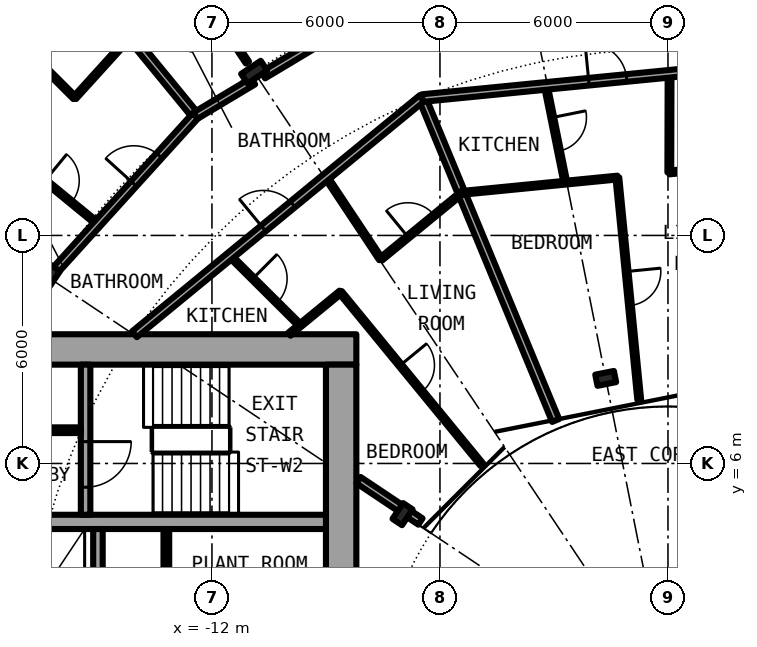
"""IFC4 building model, lengths in metres.
Left out: names, types, materials, properties, quantities, classifications, styles, units other than length and angle.
Written with IfcOpenShell. Run it as: python <this file> out.ifc"""

import sys

from ifc_helpers import new_model, si_unit, direction, frame, frame_2d, origin, origin_2d, place, context, subcontext, project, spatial, rectangle, i_section, extrude, element, fill, save


model = new_model("IFC4")
c1 = context("Model", 3, precision=1e-05, world=origin(), true_north=direction((0.0, 1.0)))
c2 = subcontext(c1, "Body", "Model", "MODEL_VIEW")
j1 = project(units=[si_unit("LENGTHUNIT", "METRE"), si_unit("PLANEANGLEUNIT", "RADIAN")], contexts=[c1])
p1 = place(None, origin())
s1 = spatial("IfcSite", under=j1, at=p1, CompositionType="ELEMENT")
p2 = place(p1, origin())
s2 = spatial("IfcBuilding", under=s1, at=p2, CompositionType="ELEMENT")
p3 = place(p2, frame((0.0, 0.0, 22.8)))
s3 = spatial("IfcBuildingStorey", under=s2, at=p3, CompositionType="ELEMENT", Elevation=22.8)
for number, where, z_axis, x_axis in (
    (1, (-10.889, 16.297, 0.0), (0.0, 0.0, 1.0), (-0.556, 0.831, 0.0)),
    (2, (-16.297, 10.889, 0.0), (0.0, 0.0, 1.0), (-0.831, 0.556, 0.0)),
):
    element("IfcColumn", number, at=place(p3, frame(where, z_axis=z_axis, x_axis=x_axis)), inside=s3, PredefinedType="COLUMN", context=c2, shape_type="SweptSolid", body=[
        extrude(i_section(OverallWidth=0.305, OverallDepth=0.62, WebThickness=0.021, FlangeThickness=0.04, FilletRadius=0.027, at=origin_2d()), origin(), (0.0, 0.0, 1.0), 3.05),
    ])
for number, where, z_axis, x_axis in (
    (3, (-1.639, 8.239, 0.0), (0.0, 0.0, 1.0), (-0.195, 0.981, 0.0)),
    (4, (-6.984, 4.667, 0.0), (0.0, 0.0, 1.0), (-0.831, 0.556, 0.0)),
):
    element("IfcColumn", number, at=place(p3, frame(where, z_axis=z_axis, x_axis=x_axis)), inside=s3, PredefinedType="COLUMN", context=c2, shape_type="SweptSolid", body=[
        extrude(i_section(OverallWidth=0.3, OverallDepth=0.5, WebThickness=0.014, FlangeThickness=0.028, FilletRadius=0.027, at=origin_2d()), origin(), (0.0, 0.0, 1.0), 3.05),
    ])
p4 = place(p3, frame((-8.2, 9.0, 0.0), z_axis=(0.0, 0.0, 1.0), x_axis=(-1.0, 0.0, 0.0)))
e5 = element("IfcWall", 5, at=p4, inside=s3, PredefinedType="SHEAR", context=c2, shape_type="SweptSolid", body=[
    extrude(rectangle(XDim=14.2, YDim=0.8, at=frame_2d((7.1, 0.0))), origin(), (0.0, 0.0, 1.0), 3.05),
])
p5 = place(p4, frame((11.675, 0.0, 0.0)))
e6 = element("IfcOpeningElement", 6, at=p5, cuts=e5, PredefinedType="OPENING", context=c2, shape_type="SweptSolid", body=[
    extrude(rectangle(XDim=1.2, YDim=2.3, at=frame_2d((0.6, 1.15))), frame((0.0, 0.41, 0.0), z_axis=(0.0, -1.0, 0.0), x_axis=(1.0, 0.0, 0.0)), (0.0, 0.0, 1.0), 0.82),
])
p6 = place(p3, frame((-8.6, 8.6, 0.0), z_axis=(0.0, 0.0, 1.0), x_axis=(0.0, -1.0, 0.0)))
e7 = element("IfcWall", 7, at=p6, inside=s3, PredefinedType="SHEAR", context=c2, shape_type="SweptSolid", body=[
    extrude(rectangle(XDim=17.2, YDim=0.8, at=frame_2d((8.6, 0.0))), origin(), (0.0, 0.0, 1.0), 3.05),
])
p7 = place(p6, frame((7.4, 0.0, 0.1)))
e8 = element("IfcOpeningElement", 8, at=p7, cuts=e7, PredefinedType="OPENING", context=c2, shape_type="SweptSolid", body=[
    extrude(rectangle(XDim=2.4, YDim=2.2, at=frame_2d((1.2, 1.1))), frame((0.0, 0.41, 0.0), z_axis=(0.0, -1.0, 0.0), x_axis=(1.0, 0.0, 0.0)), (0.0, 0.0, 1.0), 0.82),
])
p8 = place(p3, frame((-9.0, 4.462, 0.0), z_axis=(0.0, 0.0, 1.0), x_axis=(-1.0, 0.0, 0.0)))
e9 = element("IfcWall", 9, at=p8, inside=s3, PredefinedType="SHEAR", context=c2, shape_type="SweptSolid", body=[
    extrude(rectangle(XDim=10.15, YDim=0.375, at=frame_2d((5.075, 0.0))), origin(), (0.0, 0.0, 1.0), 3.05),
])
p9 = place(p3, frame((-15.325, 8.6, 0.0), z_axis=(0.0, 0.0, 1.0), x_axis=(0.0, -1.0, 0.0)))
e10 = element("IfcWall", 10, at=p9, inside=s3, PredefinedType="SHEAR", context=c2, shape_type="SweptSolid", body=[
    extrude(rectangle(XDim=3.95, YDim=0.25, at=frame_2d((1.975, 0.0))), origin(), (0.0, 0.0, 1.0), 3.05),
])
p10 = place(p9, frame((2.025, 0.0, 0.0)))
e11 = element("IfcOpeningElement", 11, at=p10, cuts=e10, PredefinedType="OPENING", context=c2, shape_type="SweptSolid", body=[
    extrude(rectangle(XDim=1.2, YDim=2.3, at=frame_2d((0.6, 1.15))), frame((0.0, 0.135, 0.0), z_axis=(0.0, -1.0, 0.0), x_axis=(1.0, 0.0, 0.0)), (0.0, 0.0, 1.0), 0.27),
])
p11 = place(p3, frame((-15.0, 1.825, 0.0), z_axis=(0.0, 0.0, 1.0), x_axis=(0.0, 1.0, 0.0)))
e12 = element("IfcWall", 12, at=p11, inside=s3, PredefinedType="SOLIDWALL", context=c2, shape_type="SweptSolid", body=[
    extrude(rectangle(XDim=2.45, YDim=0.25, at=frame_2d((1.225, 0.0))), origin(), (0.0, 0.0, 1.0), 2.7),
])
p12 = place(p3, frame((-13.2, 1.825, 0.0), z_axis=(0.0, 0.0, 1.0), x_axis=(0.0, 1.0, 0.0)))
e13 = element("IfcWall", 13, at=p12, inside=s3, PredefinedType="PARTITIONING", context=c2, shape_type="SweptSolid", body=[
    extrude(rectangle(XDim=2.45, YDim=0.15, at=frame_2d((1.225, 0.0))), origin(), (0.0, 0.0, 1.0), 2.7),
])
p13 = place(p3, frame((-15.45, 6.875, 0.0), z_axis=(0.0, 0.0, 1.0), x_axis=(-1.0, 0.0, 0.0)))
e14 = element("IfcWall", 14, at=p13, inside=s3, PredefinedType="PARTITIONING", context=c2, shape_type="SweptSolid", body=[
    extrude(rectangle(XDim=3.7, YDim=0.15, at=frame_2d((1.85, 0.0))), origin(), (0.0, 0.0, 1.0), 2.7),
])
p14 = place(p13, frame((1.4, 0.0, 0.0)))
e15 = element("IfcOpeningElement", 15, at=p14, cuts=e14, PredefinedType="OPENING", context=c2, shape_type="SweptSolid", body=[
    extrude(rectangle(XDim=0.9, YDim=2.3, at=frame_2d((0.45, 1.15))), frame((0.0, 0.085, 0.0), z_axis=(0.0, -1.0, 0.0), x_axis=(1.0, 0.0, 0.0)), (0.0, 0.0, 1.0), 0.17),
])
p15 = place(p3, frame((-19.21, 19.222, 0.0), z_axis=(0.0, 0.0, 1.0), x_axis=(0.706914880313, -0.707298629994, 0.0)))
e16 = element("IfcWall", 16, at=p15, inside=s3, PredefinedType="PARTITIONING", context=c2, shape_type="SweptSolid", body=[
    extrude(rectangle(XDim=5.09, YDim=0.1, at=frame_2d((2.545, 0.0))), origin(), (0.0, 0.0, 1.0), 2.7),
])
p16 = place(p15, frame((2.095, 0.0, 0.0)))
e17 = element("IfcOpeningElement", 17, at=p16, cuts=e16, PredefinedType="OPENING", context=c2, shape_type="SweptSolid", body=[
    extrude(rectangle(XDim=0.9, YDim=2.3, at=frame_2d((0.45, 1.15))), frame((0.0, 0.06, 0.0), z_axis=(0.0, -1.0, 0.0), x_axis=(1.0, 0.0, 0.0)), (0.0, 0.0, 1.0), 0.12),
])
p17 = place(p3, frame((-17.239, 21.008, 0.0), z_axis=(0.0, 0.0, 1.0), x_axis=(0.634318093068, -0.773072154981, 0.0)))
e18 = element("IfcWall", 18, at=p17, inside=s3, PredefinedType="PARTITIONING", context=c2, shape_type="SweptSolid", body=[
    extrude(rectangle(XDim=7.576, YDim=0.2, at=frame_2d((3.788, 0.0))), origin(), (0.0, 0.0, 1.0), 2.7),
])
p18 = place(p3, frame((-17.079, 14.004, 0.0), z_axis=(0.0, 0.0, 1.0), x_axis=(0.773424377054, -0.633888580887, 0.0)))
e19 = element("IfcWall", 19, at=p18, inside=s3, PredefinedType="PARTITIONING", context=c2, shape_type="SweptSolid", body=[
    extrude(rectangle(XDim=2.675, YDim=0.1, at=frame_2d((1.338, 0.0))), origin(), (0.0, 0.0, 1.0), 2.7),
])
p19 = place(p18, frame((0.888, 0.0, 0.0)))
e20 = element("IfcOpeningElement", 20, at=p19, cuts=e19, PredefinedType="OPENING", context=c2, shape_type="SweptSolid", body=[
    extrude(rectangle(XDim=0.9, YDim=2.3, at=frame_2d((0.45, 1.15))), frame((0.0, 0.06, 0.0), z_axis=(0.0, -1.0, 0.0), x_axis=(1.0, 0.0, 0.0)), (0.0, 0.0, 1.0), 0.12),
])
p20 = place(p3, frame((-12.276, 18.36, 0.0), z_axis=(0.0, 0.0, 1.0), x_axis=(0.55563200073, -0.831428337119, 0.0)))
e21 = element("IfcWall", 21, at=p20, inside=s3, PredefinedType="PARTITIONING", context=c2, shape_type="SweptSolid", body=[
    extrude(rectangle(XDim=2.176, YDim=0.1, at=frame_2d((1.088, 0.0))), origin(), (0.0, 0.0, 1.0), 2.7),
])
p21 = place(p20, frame((0.887, 0.0, 0.0)))
e22 = element("IfcOpeningElement", 22, at=p21, cuts=e21, PredefinedType="OPENING", context=c2, shape_type="SweptSolid", body=[
    extrude(rectangle(XDim=0.9, YDim=2.3, at=frame_2d((0.45, 1.15))), frame((0.0, 0.06, 0.0), z_axis=(0.0, -1.0, 0.0), x_axis=(1.0, 0.0, 0.0)), (0.0, 0.0, 1.0), 0.12),
])
p22 = place(p3, frame((-11.524, 11.464, 0.0), z_axis=(0.0, 0.0, 1.0), x_axis=(0.708796844581, -0.705412668665, 0.0)))
e23 = element("IfcWall", 23, at=p22, inside=s3, PredefinedType="PARTITIONING", context=c2, shape_type="SweptSolid", body=[
    extrude(rectangle(XDim=2.597, YDim=0.1, at=frame_2d((1.299, 0.0))), origin(), (0.0, 0.0, 1.0), 2.7),
])
p23 = place(p22, frame((0.849, 0.0, 0.0)))
e24 = element("IfcOpeningElement", 24, at=p23, cuts=e23, PredefinedType="OPENING", context=c2, shape_type="SweptSolid", body=[
    extrude(rectangle(XDim=0.9, YDim=2.3, at=frame_2d((0.45, 1.15))), frame((0.0, 0.06, 0.0), z_axis=(0.0, -1.0, 0.0), x_axis=(1.0, 0.0, 0.0)), (0.0, 0.0, 1.0), 0.12),
])
p24 = place(p3, frame((-8.996, 13.539, 0.0), z_axis=(0.0, 0.0, 1.0), x_axis=(0.553615197403, -0.83277260594, 0.0)))
e25 = element("IfcWall", 25, at=p24, inside=s3, PredefinedType="PARTITIONING", context=c2, shape_type="SweptSolid", body=[
    extrude(rectangle(XDim=2.597, YDim=0.1, at=frame_2d((1.299, 0.0))), origin(), (0.0, 0.0, 1.0), 2.7),
])
p25 = place(p3, frame((-8.62, 10.504, 0.0), z_axis=(0.0, 0.0, 1.0), x_axis=(0.634358693064, -0.773038840249, 0.0)))
e26 = element("IfcWall", 26, at=p25, inside=s3, PredefinedType="PARTITIONING", context=c2, shape_type="SweptSolid", body=[
    extrude(rectangle(XDim=5.868, YDim=0.1, at=frame_2d((2.934, 0.0))), origin(), (0.0, 0.0, 1.0), 2.7),
])
p26 = place(p25, frame((2.484, 0.0, 0.0)))
e27 = element("IfcOpeningElement", 27, at=p26, cuts=e26, PredefinedType="OPENING", context=c2, shape_type="SweptSolid", body=[
    extrude(rectangle(XDim=0.9, YDim=2.3, at=frame_2d((0.45, 1.15))), frame((0.0, 0.06, 0.0), z_axis=(0.0, -1.0, 0.0), x_axis=(1.0, 0.0, 0.0)), (0.0, 0.0, 1.0), 0.12),
])
p27 = place(p3, frame((-6.468, 15.614, 0.0), z_axis=(0.0, 0.0, 1.0), x_axis=(0.382518543471, -0.92394781449, 0.0)))
e28 = element("IfcWall", 28, at=p27, inside=s3, PredefinedType="PARTITIONING", context=c2, shape_type="SweptSolid", body=[
    extrude(rectangle(XDim=9.181, YDim=0.2, at=frame_2d((4.591, 0.0))), origin(), (0.0, 0.0, 1.0), 2.7),
])
p28 = place(p3, frame((-3.213, 15.934, 0.0), z_axis=(0.0, 0.0, 1.0), x_axis=(0.197851046463, -0.980232096706, 0.0)))
e29 = element("IfcWall", 29, at=p28, inside=s3, PredefinedType="PARTITIONING", context=c2, shape_type="SweptSolid", body=[
    extrude(rectangle(XDim=2.597, YDim=0.1, at=frame_2d((1.299, 0.0))), origin(), (0.0, 0.0, 1.0), 2.7),
])
p29 = place(p28, frame((0.849, 0.0, 0.0)))
e30 = element("IfcOpeningElement", 30, at=p29, cuts=e29, PredefinedType="OPENING", context=c2, shape_type="SweptSolid", body=[
    extrude(rectangle(XDim=0.9, YDim=2.3, at=frame_2d((0.45, 1.15))), frame((0.0, 0.06, 0.0), z_axis=(0.0, -1.0, 0.0), x_axis=(1.0, 0.0, 0.0)), (0.0, 0.0, 1.0), 0.12),
])
p30 = place(p3, frame((-1.332, 13.523, 0.0), z_axis=(0.0, 0.0, 1.0), x_axis=(0.097979463572, -0.995188436789, 0.0)))
e31 = element("IfcWall", 31, at=p30, inside=s3, PredefinedType="PARTITIONING", context=c2, shape_type="SweptSolid", body=[
    extrude(rectangle(XDim=5.868, YDim=0.1, at=frame_2d((2.934, 0.0))), origin(), (0.0, 0.0, 1.0), 2.7),
])
p31 = place(p30, frame((2.484, 0.0, 0.0)))
e32 = element("IfcOpeningElement", 32, at=p31, cuts=e31, PredefinedType="OPENING", context=c2, shape_type="SweptSolid", body=[
    extrude(rectangle(XDim=0.9, YDim=2.3, at=frame_2d((0.45, 1.15))), frame((0.0, 0.06, 0.0), z_axis=(0.0, -1.0, 0.0), x_axis=(1.0, 0.0, 0.0)), (0.0, 0.0, 1.0), 0.12),
])
p32 = place(p3, frame((0.035, 13.658, 0.0), z_axis=(0.0, 0.0, 1.0), x_axis=(0.00272632248, 0.999996283576, 0.0)))
e33 = element("IfcWall", 33, at=p32, inside=s3, PredefinedType="PARTITIONING", context=c2, shape_type="SweptSolid", body=[
    extrude(rectangle(XDim=2.597, YDim=0.1, at=frame_2d((1.298, 0.0))), origin(), (0.0, 0.0, 1.0), 2.7),
])
p33 = place(p3, frame((-6.513, 4.472, 0.0), z_axis=(0.0, 0.0, 1.0), x_axis=(-0.831417956244, 0.555647533996, 0.0)))
e34 = element("IfcWall", 34, at=p33, inside=s3, PredefinedType="PARTITIONING", context=c2, shape_type="SweptSolid", body=[
    extrude(rectangle(XDim=1.962, YDim=0.2, at=frame_2d((0.981, 0.0))), origin(), (0.0, 0.0, 1.0), 2.7),
])
p34 = place(p3, frame((-9.965, 9.4, 0.0), z_axis=(0.0, 0.0, 1.0), x_axis=(0.773141825369, 0.634233173104, 0.0)))
e35 = element("IfcWall", 35, at=p34, inside=s3, PredefinedType="PARTITIONING", context=c2, shape_type="SweptSolid", body=[
    extrude(rectangle(XDim=1.749, YDim=0.1, at=frame_2d((0.875, 0.0))), origin(), (0.0, 0.0, 1.0), 2.7),
])
p35 = place(p3, frame((-7.552, 11.379, 0.0), z_axis=(0.0, 0.0, 1.0), x_axis=(0.773323547924, 0.634011585246, 0.0)))
e36 = element("IfcWall", 36, at=p35, inside=s3, PredefinedType="PARTITIONING", context=c2, shape_type="SweptSolid", body=[
    extrude(rectangle(XDim=2.748, YDim=0.1, at=frame_2d((1.374, 0.0))), origin(), (0.0, 0.0, 1.0), 2.7),
])
p36 = place(p35, frame((0.917, 0.0, 0.0)))
e37 = element("IfcOpeningElement", 37, at=p36, cuts=e36, PredefinedType="OPENING", context=c2, shape_type="SweptSolid", body=[
    extrude(rectangle(XDim=0.9, YDim=2.3, at=frame_2d((0.45, 1.15))), frame((0.0, 0.06, 0.0), z_axis=(0.0, -1.0, 0.0), x_axis=(1.0, 0.0, 0.0)), (0.0, 0.0, 1.0), 0.12),
])
p37 = place(p3, frame((-5.434, 13.119, 0.0), z_axis=(0.0, 0.0, 1.0), x_axis=(0.995195804672, 0.097904598272, 0.0)))
e38 = element("IfcWall", 38, at=p37, inside=s3, PredefinedType="PARTITIONING", context=c2, shape_type="SweptSolid", body=[
    extrude(rectangle(XDim=4.127, YDim=0.1, at=frame_2d((2.063, 0.0))), origin(), (0.0, 0.0, 1.0), 2.7),
])
p38 = place(p3, frame((0.035, 13.657, 0.0), z_axis=(0.0, 0.0, 1.0), x_axis=(0.995196843386, 0.097894039223, 0.0)))
e39 = element("IfcWall", 39, at=p38, inside=s3, PredefinedType="PARTITIONING", context=c2, shape_type="SweptSolid", body=[
    extrude(rectangle(XDim=2.748, YDim=0.1, at=frame_2d((1.374, 0.0))), origin(), (0.0, 0.0, 1.0), 2.7),
])
p39 = place(p38, frame((0.924, 0.0, 0.0)))
e40 = element("IfcOpeningElement", 40, at=p39, cuts=e39, PredefinedType="OPENING", context=c2, shape_type="SweptSolid", body=[
    extrude(rectangle(XDim=0.9, YDim=2.3, at=frame_2d((0.45, 1.15))), frame((0.0, 0.06, 0.0), z_axis=(0.0, -1.0, 0.0), x_axis=(1.0, 0.0, 0.0)), (0.0, 0.0, 1.0), 0.12),
])
p40 = place(p3, frame((-14.039, 9.4, 0.0), z_axis=(0.0, 0.0, 1.0), x_axis=(0.77298340166, 0.634426245326, 0.0)))
e41 = element("IfcWall", 41, at=p40, inside=s3, PredefinedType="PARTITIONING", context=c2, shape_type="SweptSolid", body=[
    extrude(rectangle(XDim=9.793, YDim=0.2, at=frame_2d((4.896, 0.0))), origin(), (0.0, 0.0, 1.0), 2.7),
])
p41 = place(p40, frame((4.389, 0.0, 0.0)))
e42 = element("IfcOpeningElement", 42, at=p41, cuts=e41, PredefinedType="OPENING", context=c2, shape_type="SweptSolid", body=[
    extrude(rectangle(XDim=1.0, YDim=2.3, at=frame_2d((0.5, 1.15))), frame((0.0, 0.11, 0.0), z_axis=(0.0, -1.0, 0.0), x_axis=(1.0, 0.0, 0.0)), (0.0, 0.0, 1.0), 0.22),
])
p42 = place(p3, frame((-6.467, 15.614, 0.0), z_axis=(0.0, 0.0, 1.0), x_axis=(0.995201860711, 0.097843019361, 0.0)))
e43 = element("IfcWall", 43, at=p42, inside=s3, PredefinedType="PARTITIONING", context=c2, shape_type="SweptSolid", body=[
    extrude(rectangle(XDim=9.811, YDim=0.2, at=frame_2d((4.906, 0.0))), origin(), (0.0, 0.0, 1.0), 2.7),
])
p43 = place(p42, frame((4.405, 0.0, 0.0)))
e44 = element("IfcOpeningElement", 44, at=p43, cuts=e43, PredefinedType="OPENING", context=c2, shape_type="SweptSolid", body=[
    extrude(rectangle(XDim=1.0, YDim=2.3, at=frame_2d((0.5, 1.15))), frame((0.0, 0.11, 0.0), z_axis=(0.0, -1.0, 0.0), x_axis=(1.0, 0.0, 0.0)), (0.0, 0.0, 1.0), 0.22),
])
p44 = place(p3, frame((-16.193, 11.003, 0.0), z_axis=(0.0, 0.0, 1.0), x_axis=(0.671514934772, 0.740991020444, 0.0)))
e45 = element("IfcWall", 45, at=p44, inside=s3, PredefinedType="PARTITIONING", context=c2, shape_type="SweptSolid", body=[
    extrude(rectangle(XDim=5.598, YDim=0.2, at=frame_2d((2.799, 0.0))), origin(), (0.0, 0.0, 1.0), 2.38),
])
p45 = place(p44, frame((3.18, 0.0, 0.0)))
e46 = element("IfcOpeningElement", 46, at=p45, cuts=e45, PredefinedType="OPENING", context=c2, shape_type="SweptSolid", body=[
    extrude(rectangle(XDim=1.0, YDim=2.3, at=frame_2d((0.5, 1.15))), frame((0.0, 0.11, 0.0), z_axis=(0.0, -1.0, 0.0), x_axis=(1.0, 0.0, 0.0)), (0.0, 0.0, 1.0), 0.22),
])
p46 = place(p3, frame((-12.434, 15.151, 0.0), z_axis=(0.0, 0.0, 1.0), x_axis=(0.857809047014, 0.513968519329, 0.0)))
e47 = element("IfcWall", 47, at=p46, inside=s3, PredefinedType="PARTITIONING", context=c2, shape_type="SweptSolid", body=[
    extrude(rectangle(XDim=1.771, YDim=0.2, at=frame_2d((0.885, 0.0))), origin(), (0.0, 0.0, 1.0), 2.38),
])
p47 = place(p3, frame((-10.653, 16.218, 0.0), z_axis=(0.0, 0.0, 1.0), x_axis=(0.857656999296, 0.514222200569, 0.0)))
e48 = element("IfcWall", 48, at=p47, inside=s3, PredefinedType="PARTITIONING", context=c2, shape_type="SweptSolid", body=[
    extrude(rectangle(XDim=3.675, YDim=0.2, at=frame_2d((1.838, 0.0))), origin(), (0.0, 0.0, 1.0), 2.38),
])
p48 = place(p47, frame((1.257, 0.0, 0.0)))
e49 = element("IfcOpeningElement", 49, at=p48, cuts=e48, PredefinedType="OPENING", context=c2, shape_type="SweptSolid", body=[
    extrude(rectangle(XDim=1.0, YDim=2.3, at=frame_2d((0.5, 1.15))), frame((0.0, 0.11, 0.0), z_axis=(0.0, -1.0, 0.0), x_axis=(1.0, 0.0, 0.0)), (0.0, 0.0, 1.0), 0.22),
])
p49 = place(p3, frame((-15.612, 15.622, 0.0), z_axis=(0.0, 0.0, 1.0), x_axis=(0.671674967707, 0.740845960882, 0.0)))
e50 = element("IfcWall", 50, at=p49, inside=s3, PredefinedType="PARTITIONING", context=c2, shape_type="SweptSolid", body=[
    extrude(rectangle(XDim=2.181, YDim=0.1, at=frame_2d((1.091, 0.0))), origin(), (0.0, 0.0, 1.0), 2.7),
])
p50 = place(p10, origin())
e51 = element("IfcDoor", 51, at=p50, inside=s3, OperationType="SINGLE_SWING_LEFT", PredefinedType="DOOR", context=c2, shape_type="SweptSolid", body=[
    extrude(rectangle(XDim=1.2, YDim=2.3, at=frame_2d((0.6, 1.15))), frame((0.0, 0.025, 0.0), z_axis=(0.0, -1.0, 0.0), x_axis=(1.0, 0.0, 0.0)), (0.0, 0.0, 1.0), 0.05),
])
fill(e11, e51)
p51 = place(p45, origin())
e52 = element("IfcDoor", 52, at=p51, inside=s3, OperationType="SINGLE_SWING_RIGHT", PredefinedType="DOOR", context=c2, shape_type="SweptSolid", body=[
    extrude(rectangle(XDim=1.0, YDim=2.3, at=frame_2d((0.5, 1.15))), frame((0.0, 0.025, 0.0), z_axis=(0.0, -1.0, 0.0), x_axis=(1.0, 0.0, 0.0)), (0.0, 0.0, 1.0), 0.05),
])
fill(e46, e52)
p52 = place(p19, origin())
e53 = element("IfcDoor", 53, at=p52, inside=s3, OperationType="SINGLE_SWING_LEFT", PredefinedType="DOOR", context=c2, shape_type="SweptSolid", body=[
    extrude(rectangle(XDim=0.9, YDim=2.3, at=frame_2d((0.45, 1.15))), frame((0.0, 0.025, 0.0), z_axis=(0.0, -1.0, 0.0), x_axis=(1.0, 0.0, 0.0)), (0.0, 0.0, 1.0), 0.05),
])
fill(e20, e53)
p53 = place(p43, origin())
e54 = element("IfcDoor", 54, at=p53, inside=s3, OperationType="SINGLE_SWING_LEFT", PredefinedType="DOOR", context=c2, shape_type="SweptSolid", body=[
    extrude(rectangle(XDim=1.0, YDim=2.3, at=frame_2d((0.5, 1.15))), frame((0.0, 0.025, 0.0), z_axis=(0.0, -1.0, 0.0), x_axis=(1.0, 0.0, 0.0)), (0.0, 0.0, 1.0), 0.05),
])
fill(e44, e54)
p54 = place(p29, origin())
e55 = element("IfcDoor", 55, at=p54, inside=s3, OperationType="SINGLE_SWING_RIGHT", PredefinedType="DOOR", context=c2, shape_type="SweptSolid", body=[
    extrude(rectangle(XDim=0.9, YDim=2.3, at=frame_2d((0.45, 1.15))), frame((0.0, 0.025, 0.0), z_axis=(0.0, -1.0, 0.0), x_axis=(1.0, 0.0, 0.0)), (0.0, 0.0, 1.0), 0.05),
])
fill(e30, e55)
p55 = place(p31, origin())
e56 = element("IfcDoor", 56, at=p55, inside=s3, OperationType="SINGLE_SWING_RIGHT", PredefinedType="DOOR", context=c2, shape_type="SweptSolid", body=[
    extrude(rectangle(XDim=0.9, YDim=2.3, at=frame_2d((0.45, 1.15))), frame((0.0, 0.025, 0.0), z_axis=(0.0, -1.0, 0.0), x_axis=(1.0, 0.0, 0.0)), (0.0, 0.0, 1.0), 0.05),
])
fill(e32, e56)
p56 = place(p41, origin())
e57 = element("IfcDoor", 57, at=p56, inside=s3, OperationType="SINGLE_SWING_LEFT", PredefinedType="DOOR", context=c2, shape_type="SweptSolid", body=[
    extrude(rectangle(XDim=1.0, YDim=2.3, at=frame_2d((0.5, 1.15))), frame((0.0, 0.025, 0.0), z_axis=(0.0, -1.0, 0.0), x_axis=(1.0, 0.0, 0.0)), (0.0, 0.0, 1.0), 0.05),
])
fill(e42, e57)
p57 = place(p36, origin())
e58 = element("IfcDoor", 58, at=p57, inside=s3, OperationType="SINGLE_SWING_LEFT", PredefinedType="DOOR", context=c2, shape_type="SweptSolid", body=[
    extrude(rectangle(XDim=0.9, YDim=2.3, at=frame_2d((0.45, 1.15))), frame((0.0, 0.025, 0.0), z_axis=(0.0, -1.0, 0.0), x_axis=(1.0, 0.0, 0.0)), (0.0, 0.0, 1.0), 0.05),
])
fill(e37, e58)
p58 = place(p23, origin())
e59 = element("IfcDoor", 59, at=p58, inside=s3, OperationType="SINGLE_SWING_RIGHT", PredefinedType="DOOR", context=c2, shape_type="SweptSolid", body=[
    extrude(rectangle(XDim=0.9, YDim=2.3, at=frame_2d((0.45, 1.15))), frame((0.0, 0.025, 0.0), z_axis=(0.0, -1.0, 0.0), x_axis=(1.0, 0.0, 0.0)), (0.0, 0.0, 1.0), 0.05),
])
fill(e24, e59)
p59 = place(p26, origin())
e60 = element("IfcDoor", 60, at=p59, inside=s3, OperationType="SINGLE_SWING_RIGHT", PredefinedType="DOOR", context=c2, shape_type="SweptSolid", body=[
    extrude(rectangle(XDim=0.9, YDim=2.3, at=frame_2d((0.45, 1.15))), frame((0.0, 0.025, 0.0), z_axis=(0.0, -1.0, 0.0), x_axis=(1.0, 0.0, 0.0)), (0.0, 0.0, 1.0), 0.05),
])
fill(e27, e60)
save(model, sys.argv[1])
